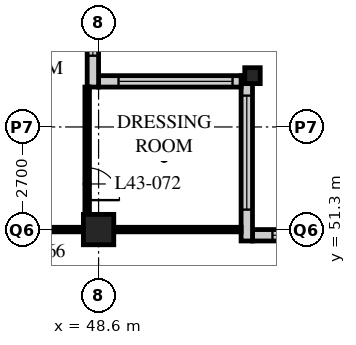
"""IFC4 building model, lengths in metres.
Left out: names, types, materials, properties, quantities, classifications, styles, units other than length and angle.
Written with IfcOpenShell. Run it as: python <this file> out.ifc"""

import sys

from ifc_helpers import new_model, si_unit, direction, frame, frame_2d, origin, origin_2d, place, context, subcontext, project, spatial, rectangle, hollow_rectangle, i_section, extrude, element, fill, save


model = new_model("IFC4")
c1 = context("Model", 3, precision=1e-05, world=origin(), true_north=direction((0.0, 1.0)))
c2 = subcontext(c1, "Body", "Model", "MODEL_VIEW")
j1 = project(units=[si_unit("LENGTHUNIT", "METRE"), si_unit("PLANEANGLEUNIT", "RADIAN")], contexts=[c1])
p1 = place(None, origin())
s1 = spatial("IfcSite", under=j1, at=p1, CompositionType="ELEMENT")
p2 = place(p1, origin())
s2 = spatial("IfcBuilding", under=s1, at=p2, CompositionType="ELEMENT")
p3 = place(p2, frame((0.0, 0.0, 170.4)))
s3 = spatial("IfcBuildingStorey", under=s2, at=p3, CompositionType="ELEMENT", Elevation=170.4)
p4 = place(p3, frame((48.6, 51.3, 0.0), z_axis=(0.0, 0.0, 1.0), x_axis=(1.0, 0.0, 0.0)))
e1 = element("IfcColumn", 1, at=p4, inside=s3, PredefinedType="COLUMN", context=c2, shape_type="SweptSolid", body=[
    extrude(hollow_rectangle(XDim=0.8, YDim=0.8, WallThickness=0.08, at=origin_2d()), origin(), (0.0, 0.0, 1.0), 3.6),
])
p5 = place(p3, frame((52.65, 55.35, 0.0), z_axis=(0.0, 0.0, 1.0), x_axis=(1.0, 0.0, 0.0)))
e2 = element("IfcColumn", 2, at=p5, inside=s3, PredefinedType="COLUMN", context=c2, shape_type="SweptSolid", body=[
    extrude(i_section(OverallWidth=0.407, OverallDepth=0.419, WebThickness=0.031, FlangeThickness=0.049, FilletRadius=0.015, at=origin_2d()), origin(), (0.0, 0.0, 1.0), 3.6),
])
p6 = place(p3, frame((56.4, 51.15, 0.0), z_axis=(0.0, 0.0, 1.0), x_axis=(-1.0, 0.0, 0.0)))
e3 = element("IfcWall", 3, at=p6, inside=s3, PredefinedType="SOLIDWALL", context=c2, shape_type="SweptSolid", body=[
    extrude(rectangle(XDim=3.75, YDim=0.3, at=frame_2d((1.875, 0.0))), origin(), (0.0, 0.0, 1.0), 3.39),
])
p7 = place(p6, frame((0.225, 0.0, 0.6)))
e4 = element("IfcOpeningElement", 4, at=p7, cuts=e3, PredefinedType="OPENING", context=c2, shape_type="SweptSolid", body=[
    extrude(rectangle(XDim=3.0, YDim=2.0, at=frame_2d((1.5, 1.0))), frame((0.0, 0.16, 0.0), z_axis=(0.0, -1.0, 0.0), x_axis=(1.0, 0.0, 0.0)), (0.0, 0.0, 1.0), 0.32),
])
p8 = place(p3, frame((52.5, 51.0, 0.0), z_axis=(0.0, 0.0, 1.0), x_axis=(0.0, 1.0, 0.0)))
e5 = element("IfcWall", 5, at=p8, inside=s3, PredefinedType="SOLIDWALL", context=c2, shape_type="SweptSolid", body=[
    extrude(rectangle(XDim=4.35, YDim=0.3, at=frame_2d((2.175, 0.0))), origin(), (0.0, 0.0, 1.0), 3.39),
])
p9 = place(p8, frame((0.825, 0.0, 0.6)))
e6 = element("IfcOpeningElement", 6, at=p9, cuts=e5, PredefinedType="OPENING", context=c2, shape_type="SweptSolid", body=[
    extrude(rectangle(XDim=3.0, YDim=2.0, at=frame_2d((1.5, 1.0))), frame((0.0, 0.16, 0.0), z_axis=(0.0, -1.0, 0.0), x_axis=(1.0, 0.0, 0.0)), (0.0, 0.0, 1.0), 0.32),
])
p10 = place(p3, frame((52.35, 55.2, 0.0), z_axis=(0.0, 0.0, 1.0), x_axis=(-1.0, 0.0, 0.0)))
e7 = element("IfcWall", 7, at=p10, inside=s3, PredefinedType="SOLIDWALL", context=c2, shape_type="SweptSolid", body=[
    extrude(rectangle(XDim=3.75, YDim=0.3, at=frame_2d((1.875, 0.0))), origin(), (0.0, 0.0, 1.0), 3.39),
])
p11 = place(p10, frame((0.225, 0.0, 0.6)))
e8 = element("IfcOpeningElement", 8, at=p11, cuts=e7, PredefinedType="OPENING", context=c2, shape_type="SweptSolid", body=[
    extrude(rectangle(XDim=3.0, YDim=2.0, at=frame_2d((1.5, 1.0))), frame((0.0, 0.16, 0.0), z_axis=(0.0, -1.0, 0.0), x_axis=(1.0, 0.0, 0.0)), (0.0, 0.0, 1.0), 0.32),
])
p12 = place(p3, frame((48.45, 55.05, 0.0), z_axis=(0.0, 0.0, 1.0), x_axis=(0.0, 1.0, 0.0)))
e9 = element("IfcWall", 9, at=p12, inside=s3, PredefinedType="SOLIDWALL", context=c2, shape_type="SweptSolid", body=[
    extrude(rectangle(XDim=4.35, YDim=0.3, at=frame_2d((2.175, 0.0))), origin(), (0.0, 0.0, 1.0), 3.39),
])
p13 = place(p12, frame((0.825, 0.0, 0.6)))
e10 = element("IfcOpeningElement", 10, at=p13, cuts=e9, PredefinedType="OPENING", context=c2, shape_type="SweptSolid", body=[
    extrude(rectangle(XDim=3.0, YDim=2.0, at=frame_2d((1.5, 1.0))), frame((0.0, 0.16, 0.0), z_axis=(0.0, -1.0, 0.0), x_axis=(1.0, 0.0, 0.0)), (0.0, 0.0, 1.0), 0.32),
])
p14 = place(p3, frame((44.55, 51.3, 0.0), z_axis=(0.0, 0.0, 1.0), x_axis=(1.0, 0.0, 0.0)))
e11 = element("IfcWall", 11, at=p14, inside=s3, PredefinedType="PARTITIONING", context=c2, shape_type="SweptSolid", body=[
    extrude(rectangle(XDim=7.8, YDim=0.12, at=frame_2d((3.9, 0.0))), origin(), (0.0, 0.0, 1.0), 2.778),
])
p15 = place(p14, frame((1.875, 0.0, 0.0)))
e12 = element("IfcOpeningElement", 12, at=p15, cuts=e11, PredefinedType="OPENING", context=c2, shape_type="SweptSolid", body=[
    extrude(rectangle(XDim=0.85, YDim=2.1, at=frame_2d((0.425, 1.05))), frame((0.0, 0.07, 0.0), z_axis=(0.0, -1.0, 0.0), x_axis=(1.0, 0.0, 0.0)), (0.0, 0.0, 1.0), 0.14),
])
p16 = place(p3, frame((48.3, 51.3, 0.0), z_axis=(0.0, 0.0, 1.0), x_axis=(0.0, 1.0, 0.0)))
e13 = element("IfcWall", 13, at=p16, inside=s3, PredefinedType="PARTITIONING", context=c2, shape_type="SweptSolid", body=[
    extrude(rectangle(XDim=3.75, YDim=0.12, at=frame_2d((1.875, 0.0))), origin(), (0.0, 0.0, 1.0), 3.39),
])
p17 = place(p16, frame((0.775, 0.0, 0.0)))
e14 = element("IfcOpeningElement", 14, at=p17, cuts=e13, PredefinedType="OPENING", context=c2, shape_type="SweptSolid", body=[
    extrude(rectangle(XDim=0.85, YDim=2.1, at=frame_2d((0.425, 1.05))), frame((0.0, 0.07, 0.0), z_axis=(0.0, -1.0, 0.0), x_axis=(1.0, 0.0, 0.0)), (0.0, 0.0, 1.0), 0.14),
])
p18 = place(p7, origin())
e15 = element("IfcWindow", 15, at=p18, inside=s3, PartitioningType="SINGLE_PANEL", PredefinedType="WINDOW", context=c2, shape_type="SweptSolid", body=[
    extrude(rectangle(XDim=3.0, YDim=2.0, at=frame_2d((1.5, 1.0))), frame((0.0, 0.03, 0.0), z_axis=(0.0, -1.0, 0.0), x_axis=(1.0, 0.0, 0.0)), (0.0, 0.0, 1.0), 0.06),
])
fill(e4, e15)
p19 = place(p9, origin())
e16 = element("IfcWindow", 16, at=p19, inside=s3, PartitioningType="SINGLE_PANEL", PredefinedType="WINDOW", context=c2, shape_type="SweptSolid", body=[
    extrude(rectangle(XDim=3.0, YDim=2.0, at=frame_2d((1.5, 1.0))), frame((0.0, 0.03, 0.0), z_axis=(0.0, -1.0, 0.0), x_axis=(1.0, 0.0, 0.0)), (0.0, 0.0, 1.0), 0.06),
])
fill(e6, e16)
p20 = place(p11, origin())
e17 = element("IfcWindow", 17, at=p20, inside=s3, PartitioningType="SINGLE_PANEL", PredefinedType="WINDOW", context=c2, shape_type="SweptSolid", body=[
    extrude(rectangle(XDim=3.0, YDim=2.0, at=frame_2d((1.5, 1.0))), frame((0.0, 0.03, 0.0), z_axis=(0.0, -1.0, 0.0), x_axis=(1.0, 0.0, 0.0)), (0.0, 0.0, 1.0), 0.06),
])
fill(e8, e17)
p21 = place(p13, origin())
e18 = element("IfcWindow", 18, at=p21, inside=s3, PartitioningType="SINGLE_PANEL", PredefinedType="WINDOW", context=c2, shape_type="SweptSolid", body=[
    extrude(rectangle(XDim=3.0, YDim=2.0, at=frame_2d((1.5, 1.0))), frame((0.0, 0.03, 0.0), z_axis=(0.0, -1.0, 0.0), x_axis=(1.0, 0.0, 0.0)), (0.0, 0.0, 1.0), 0.06),
])
fill(e10, e18)
p22 = place(p17, origin())
e19 = element("IfcDoor", 19, at=p22, inside=s3, OperationType="SINGLE_SWING_RIGHT", PredefinedType="DOOR", context=c2, shape_type="SweptSolid", body=[
    extrude(rectangle(XDim=0.85, YDim=2.1, at=frame_2d((0.425, 1.05))), frame((0.0, 0.025, 0.0), z_axis=(0.0, -1.0, 0.0), x_axis=(1.0, 0.0, 0.0)), (0.0, 0.0, 1.0), 0.05),
])
fill(e14, e19)
save(model, sys.argv[1])
